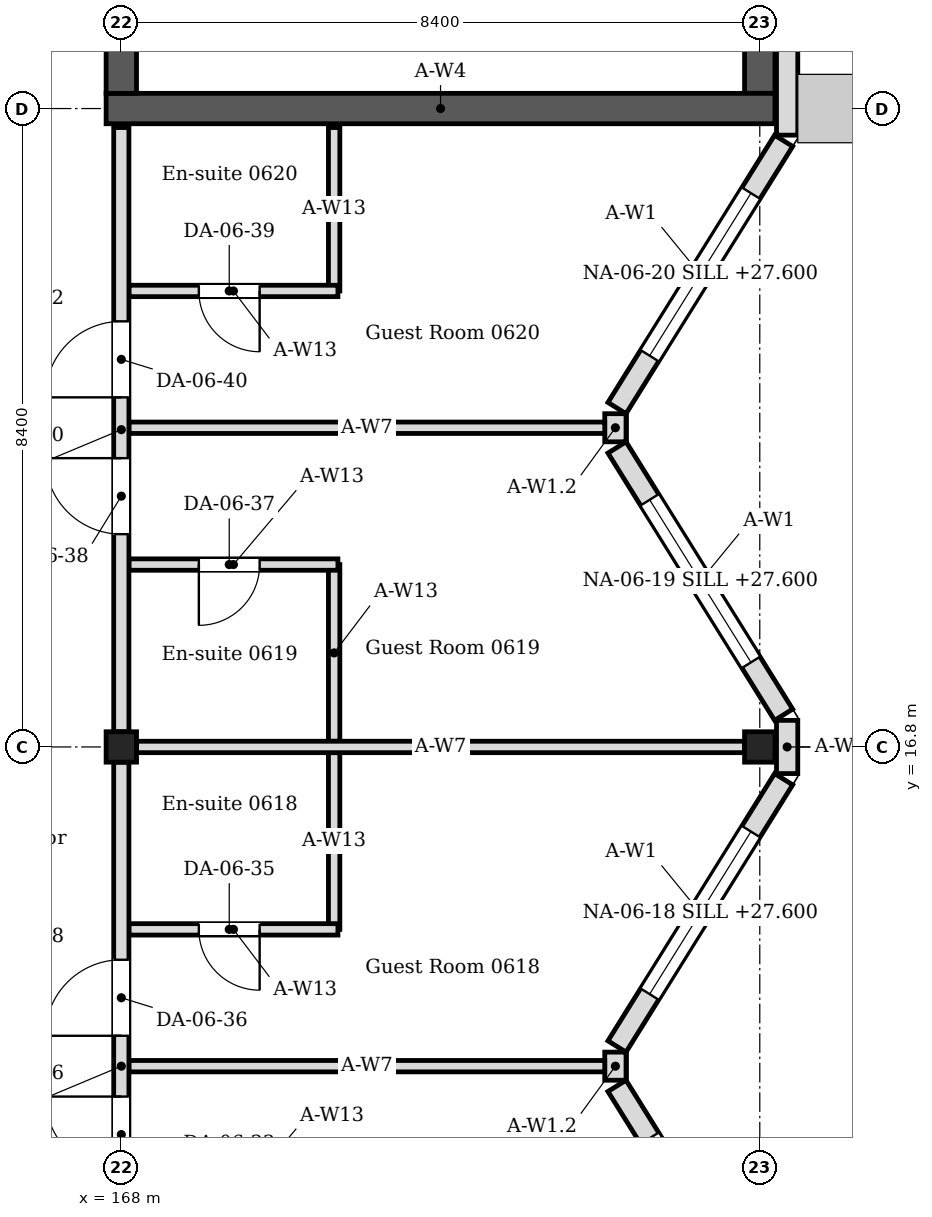
"""IFC4 building model, lengths in metres.
Left out: names, types, materials, properties, quantities, classifications, styles, units other than length and angle.
Written with IfcOpenShell. Run it as: python <this file> out.ifc"""

import sys

from ifc_helpers import new_model, si_unit, direction, frame, frame_2d, origin, origin_2d, place, context, subcontext, project, spatial, rectangle, i_section, extrude, element, fill, save


model = new_model("IFC4")
c1 = context("Model", 3, precision=1e-05, world=origin(), true_north=direction((0.0, 1.0)))
c2 = subcontext(c1, "Body", "Model", "MODEL_VIEW")
j1 = project(units=[si_unit("LENGTHUNIT", "METRE"), si_unit("PLANEANGLEUNIT", "RADIAN")], contexts=[c1])
p1 = place(None, origin())
s1 = spatial("IfcSite", under=j1, at=p1, CompositionType="ELEMENT")
p2 = place(p1, origin())
s2 = spatial("IfcBuilding", under=s1, at=p2, CompositionType="ELEMENT")
p3 = place(p2, frame((0.0, 0.0, 27.0)))
s3 = spatial("IfcBuildingStorey", under=s2, at=p3, CompositionType="ELEMENT", Elevation=27.0)
for number, where, z_axis, x_axis in (
    (1, (168.0, 16.8, 0.0), (0.0, 0.0, 1.0), (1.0, 0.0, 0.0)),
    (2, (176.4, 16.8, 0.0), (0.0, 0.0, 1.0), (1.0, 0.0, 0.0)),
):
    element("IfcColumn", number, at=place(p3, frame(where, z_axis=z_axis, x_axis=x_axis)), inside=s3, PredefinedType="COLUMN", context=c2, shape_type="SweptSolid", body=[
        extrude(i_section(OverallWidth=0.4, OverallDepth=0.4, WebThickness=0.013, FlangeThickness=0.021, FilletRadius=0.022, at=origin_2d()), origin(), (0.0, 0.0, 1.0), 4.2),
    ])
p4 = place(p3, frame((167.8, 25.2, 0.0), z_axis=(0.0, 0.0, 1.0), x_axis=(1.0, 0.0, 0.0)))
e3 = element("IfcWall", 3, at=p4, inside=s3, PredefinedType="SOLIDWALL", context=c2, shape_type="SweptSolid", body=[
    extrude(rectangle(XDim=8.8, YDim=0.4, at=frame_2d((4.4, 0.0))), origin(), (0.0, 0.0, 1.0), 4.05),
])
p5 = place(p3, frame((168.0, 25.4, 0.0), z_axis=(0.0, 0.0, 1.0), x_axis=(0.0, 1.0, 0.0)))
e4 = element("IfcWall", 4, at=p5, inside=s3, PredefinedType="SOLIDWALL", context=c2, shape_type="SweptSolid", body=[
    extrude(rectangle(XDim=16.4, YDim=0.4, at=frame_2d((8.2, 0.0))), origin(), (0.0, 0.0, 1.0), 4.05),
])
p6 = place(p5, frame((1.0, 0.0, 0.0)))
e5 = element("IfcOpeningElement", 5, at=p6, cuts=e4, PredefinedType="OPENING", context=c2, shape_type="SweptSolid", body=[
    extrude(rectangle(XDim=1.0, YDim=2.1, at=frame_2d((0.5, 1.05))), frame((0.0, 0.21, 0.0), z_axis=(0.0, -1.0, 0.0), x_axis=(1.0, 0.0, 0.0)), (0.0, 0.0, 1.0), 0.42),
])
p7 = place(p5, frame((14.4, 0.0, 0.0)))
e6 = element("IfcOpeningElement", 6, at=p7, cuts=e4, PredefinedType="OPENING", context=c2, shape_type="SweptSolid", body=[
    extrude(rectangle(XDim=1.4, YDim=2.1, at=frame_2d((0.7, 1.05))), frame((0.0, 0.21, 0.0), z_axis=(0.0, -1.0, 0.0), x_axis=(1.0, 0.0, 0.0)), (0.0, 0.0, 1.0), 0.42),
])
p8 = place(p3, frame((176.4, 25.4, 0.0), z_axis=(0.0, 0.0, 1.0), x_axis=(0.0, 1.0, 0.0)))
e7 = element("IfcWall", 7, at=p8, inside=s3, PredefinedType="SOLIDWALL", context=c2, shape_type="SweptSolid", body=[
    extrude(rectangle(XDim=16.4, YDim=0.4, at=frame_2d((8.2, 0.0))), origin(), (0.0, 0.0, 1.0), 4.05),
])
p9 = place(p3, frame((176.714, 8.824, 0.0), z_axis=(0.0, 0.0, 1.0), x_axis=(-0.529018946142, 0.848610013271, 0.0)))
e8 = element("IfcWall", 8, at=p9, inside=s3, PredefinedType="SOLIDWALL", context=c2, shape_type="SweptSolid", body=[
    extrude(rectangle(XDim=4.144, YDim=0.28, at=frame_2d((2.072, 0.0))), origin(), (0.0, 0.0, 1.0), 4.05),
])
p10 = place(p9, frame((0.812, 0.0, 0.6)))
e9 = element("IfcOpeningElement", 9, at=p10, cuts=e8, PredefinedType="OPENING", context=c2, shape_type="SweptSolid", body=[
    extrude(rectangle(XDim=2.52, YDim=2.4, at=frame_2d((1.26, 1.2))), frame((0.0, 0.15, 0.0), z_axis=(0.0, -1.0, 0.0), x_axis=(1.0, 0.0, 0.0)), (0.0, 0.0, 1.0), 0.3),
])
p11 = place(p3, frame((174.521, 12.859, 0.0), z_axis=(0.0, 0.0, 1.0), x_axis=(0.528992500338, 0.848626498871, 0.0)))
e10 = element("IfcWall", 10, at=p11, inside=s3, PredefinedType="SOLIDWALL", context=c2, shape_type="SweptSolid", body=[
    extrude(rectangle(XDim=4.145, YDim=0.28, at=frame_2d((2.072, 0.0))), origin(), (0.0, 0.0, 1.0), 4.05),
])
p12 = place(p11, frame((0.812, 0.0, 0.6)))
e11 = element("IfcOpeningElement", 11, at=p12, cuts=e10, PredefinedType="OPENING", context=c2, shape_type="SweptSolid", body=[
    extrude(rectangle(XDim=2.52, YDim=2.4, at=frame_2d((1.26, 1.2))), frame((0.0, 0.15, 0.0), z_axis=(0.0, -1.0, 0.0), x_axis=(1.0, 0.0, 0.0)), (0.0, 0.0, 1.0), 0.3),
])
p13 = place(p3, frame((174.5, 12.415, 0.0), z_axis=(0.0, 0.0, 1.0), x_axis=(0.0, 1.0, 0.0)))
e12 = element("IfcWall", 12, at=p13, inside=s3, PredefinedType="SOLIDWALL", context=c2, shape_type="SweptSolid", body=[
    extrude(rectangle(XDim=0.37, YDim=0.28, at=frame_2d((0.185, 0.0))), origin(), (0.0, 0.0, 1.0), 3.604),
])
p14 = place(p3, frame((176.76, 16.45, 0.0), z_axis=(0.0, 0.0, 1.0), x_axis=(0.0, 1.0, 0.0)))
e13 = element("IfcWall", 13, at=p14, inside=s3, PredefinedType="SOLIDWALL", context=c2, shape_type="SweptSolid", body=[
    extrude(rectangle(XDim=0.7, YDim=0.28, at=frame_2d((0.35, 0.0))), origin(), (0.0, 0.0, 1.0), 4.05),
])
p15 = place(p3, frame((176.714, 17.224, 0.0), z_axis=(0.0, 0.0, 1.0), x_axis=(-0.529018946142, 0.848610013271, 0.0)))
e14 = element("IfcWall", 14, at=p15, inside=s3, PredefinedType="SOLIDWALL", context=c2, shape_type="SweptSolid", body=[
    extrude(rectangle(XDim=4.144, YDim=0.28, at=frame_2d((2.072, 0.0))), origin(), (0.0, 0.0, 1.0), 4.05),
])
p16 = place(p15, frame((0.812, 0.0, 0.6)))
e15 = element("IfcOpeningElement", 15, at=p16, cuts=e14, PredefinedType="OPENING", context=c2, shape_type="SweptSolid", body=[
    extrude(rectangle(XDim=2.52, YDim=2.4, at=frame_2d((1.26, 1.2))), frame((0.0, 0.15, 0.0), z_axis=(0.0, -1.0, 0.0), x_axis=(1.0, 0.0, 0.0)), (0.0, 0.0, 1.0), 0.3),
])
p17 = place(p3, frame((174.521, 21.259, 0.0), z_axis=(0.0, 0.0, 1.0), x_axis=(0.529018946142, 0.848610013271, 0.0)))
e16 = element("IfcWall", 16, at=p17, inside=s3, PredefinedType="SOLIDWALL", context=c2, shape_type="SweptSolid", body=[
    extrude(rectangle(XDim=4.144, YDim=0.28, at=frame_2d((2.072, 0.0))), origin(), (0.0, 0.0, 1.0), 4.05),
])
p18 = place(p17, frame((0.812, 0.0, 0.6)))
e17 = element("IfcOpeningElement", 17, at=p18, cuts=e16, PredefinedType="OPENING", context=c2, shape_type="SweptSolid", body=[
    extrude(rectangle(XDim=2.52, YDim=2.4, at=frame_2d((1.26, 1.2))), frame((0.0, 0.15, 0.0), z_axis=(0.0, -1.0, 0.0), x_axis=(1.0, 0.0, 0.0)), (0.0, 0.0, 1.0), 0.3),
])
p19 = place(p3, frame((174.5, 20.815, 0.0), z_axis=(0.0, 0.0, 1.0), x_axis=(0.0, 1.0, 0.0)))
e18 = element("IfcWall", 18, at=p19, inside=s3, PredefinedType="SOLIDWALL", context=c2, shape_type="SweptSolid", body=[
    extrude(rectangle(XDim=0.37, YDim=0.28, at=frame_2d((0.185, 0.0))), origin(), (0.0, 0.0, 1.0), 3.604),
])
p20 = place(p3, frame((176.76, 24.85, 0.0), z_axis=(0.0, 0.0, 1.0), x_axis=(0.0, 1.0, 0.0)))
e19 = element("IfcWall", 19, at=p20, inside=s3, PredefinedType="SOLIDWALL", context=c2, shape_type="SweptSolid", body=[
    extrude(rectangle(XDim=42.57, YDim=0.28, at=frame_2d((21.285, 0.0))), origin(), (0.0, 0.0, 1.0), 4.05),
])
p21 = place(p20, frame((17.57, 0.0, 0.6)))
e20 = element("IfcOpeningElement", 20, at=p21, cuts=e19, PredefinedType="OPENING", context=c2, shape_type="SweptSolid", body=[
    extrude(rectangle(XDim=2.52, YDim=2.4, at=frame_2d((1.26, 1.2))), frame((0.0, 0.15, 0.0), z_axis=(0.0, -1.0, 0.0), x_axis=(1.0, 0.0, 0.0)), (0.0, 0.0, 1.0), 0.3),
])
p22 = place(p20, frame((21.77, 0.0, 0.6)))
e21 = element("IfcOpeningElement", 21, at=p22, cuts=e19, PredefinedType="OPENING", context=c2, shape_type="SweptSolid", body=[
    extrude(rectangle(XDim=2.52, YDim=2.4, at=frame_2d((1.26, 1.2))), frame((0.0, 0.15, 0.0), z_axis=(0.0, -1.0, 0.0), x_axis=(1.0, 0.0, 0.0)), (0.0, 0.0, 1.0), 0.3),
])
p23 = place(p20, frame((26.81, 0.0, 0.45)))
e22 = element("IfcOpeningElement", 22, at=p23, cuts=e19, PredefinedType="OPENING", context=c2, shape_type="SweptSolid", body=[
    extrude(rectangle(XDim=2.52, YDim=2.1, at=frame_2d((1.26, 1.05))), frame((0.0, 0.15, 0.0), z_axis=(0.0, -1.0, 0.0), x_axis=(1.0, 0.0, 0.0)), (0.0, 0.0, 1.0), 0.3),
])
p24 = place(p20, frame((31.01, 0.0, 0.6)))
e23 = element("IfcOpeningElement", 23, at=p24, cuts=e19, PredefinedType="OPENING", context=c2, shape_type="SweptSolid", body=[
    extrude(rectangle(XDim=2.52, YDim=2.4, at=frame_2d((1.26, 1.2))), frame((0.0, 0.15, 0.0), z_axis=(0.0, -1.0, 0.0), x_axis=(1.0, 0.0, 0.0)), (0.0, 0.0, 1.0), 0.3),
])
p25 = place(p3, frame((170.8, 14.4, 0.0), z_axis=(0.0, 0.0, 1.0), x_axis=(0.0, 1.0, 0.0)))
e24 = element("IfcWall", 24, at=p25, inside=s3, PredefinedType="PARTITIONING", context=c2, shape_type="SweptSolid", body=[
    extrude(rectangle(XDim=2.325, YDim=0.15, at=frame_2d((1.163, 0.0))), origin(), (0.0, 0.0, 1.0), 4.05),
])
p26 = place(p3, frame((170.85, 14.4, 0.0), z_axis=(0.0, 0.0, 1.0), x_axis=(-1.0, 0.0, 0.0)))
e25 = element("IfcWall", 25, at=p26, inside=s3, PredefinedType="PARTITIONING", context=c2, shape_type="SweptSolid", body=[
    extrude(rectangle(XDim=2.75, YDim=0.15, at=frame_2d((1.375, 0.0))), origin(), (0.0, 0.0, 1.0), 4.05),
])
p27 = place(p26, frame((1.03, 0.0, 0.0)))
e26 = element("IfcOpeningElement", 26, at=p27, cuts=e25, PredefinedType="OPENING", context=c2, shape_type="SweptSolid", body=[
    extrude(rectangle(XDim=0.8, YDim=2.1, at=frame_2d((0.4, 1.05))), frame((0.0, 0.085, 0.0), z_axis=(0.0, -1.0, 0.0), x_axis=(1.0, 0.0, 0.0)), (0.0, 0.0, 1.0), 0.17),
])
p28 = place(p3, frame((170.8, 16.875, 0.0), z_axis=(0.0, 0.0, 1.0), x_axis=(0.0, 1.0, 0.0)))
e27 = element("IfcWall", 27, at=p28, inside=s3, PredefinedType="PARTITIONING", context=c2, shape_type="SweptSolid", body=[
    extrude(rectangle(XDim=2.325, YDim=0.15, at=frame_2d((1.163, 0.0))), origin(), (0.0, 0.0, 1.0), 4.05),
])
p29 = place(p3, frame((170.85, 19.2, 0.0), z_axis=(0.0, 0.0, 1.0), x_axis=(-1.0, 0.0, 0.0)))
e28 = element("IfcWall", 28, at=p29, inside=s3, PredefinedType="PARTITIONING", context=c2, shape_type="SweptSolid", body=[
    extrude(rectangle(XDim=2.75, YDim=0.15, at=frame_2d((1.375, 0.0))), origin(), (0.0, 0.0, 1.0), 4.05),
])
p30 = place(p29, frame((1.03, 0.0, 0.0)))
e29 = element("IfcOpeningElement", 29, at=p30, cuts=e28, PredefinedType="OPENING", context=c2, shape_type="SweptSolid", body=[
    extrude(rectangle(XDim=0.8, YDim=2.1, at=frame_2d((0.4, 1.05))), frame((0.0, 0.085, 0.0), z_axis=(0.0, -1.0, 0.0), x_axis=(1.0, 0.0, 0.0)), (0.0, 0.0, 1.0), 0.17),
])
p31 = place(p3, frame((170.8, 22.8, 0.0), z_axis=(0.0, 0.0, 1.0), x_axis=(0.0, 1.0, 0.0)))
e30 = element("IfcWall", 30, at=p31, inside=s3, PredefinedType="PARTITIONING", context=c2, shape_type="SweptSolid", body=[
    extrude(rectangle(XDim=2.15, YDim=0.15, at=frame_2d((1.075, 0.0))), origin(), (0.0, 0.0, 1.0), 4.05),
])
p32 = place(p3, frame((170.85, 22.8, 0.0), z_axis=(0.0, 0.0, 1.0), x_axis=(-1.0, 0.0, 0.0)))
e31 = element("IfcWall", 31, at=p32, inside=s3, PredefinedType="PARTITIONING", context=c2, shape_type="SweptSolid", body=[
    extrude(rectangle(XDim=2.75, YDim=0.15, at=frame_2d((1.375, 0.0))), origin(), (0.0, 0.0, 1.0), 4.05),
])
p33 = place(p32, frame((1.03, 0.0, 0.0)))
e32 = element("IfcOpeningElement", 32, at=p33, cuts=e31, PredefinedType="OPENING", context=c2, shape_type="SweptSolid", body=[
    extrude(rectangle(XDim=0.8, YDim=2.1, at=frame_2d((0.4, 1.05))), frame((0.0, 0.085, 0.0), z_axis=(0.0, -1.0, 0.0), x_axis=(1.0, 0.0, 0.0)), (0.0, 0.0, 1.0), 0.17),
])
p34 = place(p3, frame((168.2, 16.8, 0.0), z_axis=(0.0, 0.0, 1.0), x_axis=(1.0, 0.0, 0.0)))
e33 = element("IfcWall", 33, at=p34, inside=s3, PredefinedType="PARTITIONING", context=c2, shape_type="SweptSolid", body=[
    extrude(rectangle(XDim=8.0, YDim=0.15, at=frame_2d((4.0, 0.0))), origin(), (0.0, 0.0, 1.0), 3.604),
])
for number, where, z_axis, x_axis in (
    (34, (168.1, 12.6, 0.0), (0.0, 0.0, 1.0), (1.0, 0.0, 0.0)),
    (35, (168.1, 21.0, 0.0), (0.0, 0.0, 1.0), (1.0, 0.0, 0.0)),
):
    element("IfcWall", number, at=place(p3, frame(where, z_axis=z_axis, x_axis=x_axis)), inside=s3, PredefinedType="PARTITIONING", context=c2, shape_type="SweptSolid", body=[
        extrude(rectangle(XDim=6.26, YDim=0.15, at=frame_2d((3.13, 0.0))), origin(), (0.0, 0.0, 1.0), 3.604),
    ])
p35 = place(p3, frame((168.0, 8.6, 0.0), z_axis=(0.0, 0.0, 1.0), x_axis=(0.0, 1.0, 0.0)))
e36 = element("IfcWall", 36, at=p35, inside=s3, PredefinedType="PARTITIONING", context=c2, shape_type="SweptSolid", body=[
    extrude(rectangle(XDim=8.0, YDim=0.2, at=frame_2d((4.0, 0.0))), origin(), (0.0, 0.0, 1.0), 3.45),
])
p36 = place(p35, frame((2.6, 0.0, 0.0)))
e37 = element("IfcOpeningElement", 37, at=p36, cuts=e36, PredefinedType="OPENING", context=c2, shape_type="SweptSolid", body=[
    extrude(rectangle(XDim=1.0, YDim=2.4, at=frame_2d((0.5, 1.2))), frame((0.0, 0.11, 0.0), z_axis=(0.0, -1.0, 0.0), x_axis=(1.0, 0.0, 0.0)), (0.0, 0.0, 1.0), 0.22),
])
p37 = place(p35, frame((4.4, 0.0, 0.0)))
e38 = element("IfcOpeningElement", 38, at=p37, cuts=e36, PredefinedType="OPENING", context=c2, shape_type="SweptSolid", body=[
    extrude(rectangle(XDim=1.0, YDim=2.4, at=frame_2d((0.5, 1.2))), frame((0.0, 0.11, 0.0), z_axis=(0.0, -1.0, 0.0), x_axis=(1.0, 0.0, 0.0)), (0.0, 0.0, 1.0), 0.22),
])
p38 = place(p3, frame((168.0, 17.0, 0.0), z_axis=(0.0, 0.0, 1.0), x_axis=(0.0, 1.0, 0.0)))
e39 = element("IfcWall", 39, at=p38, inside=s3, PredefinedType="PARTITIONING", context=c2, shape_type="SweptSolid", body=[
    extrude(rectangle(XDim=7.95, YDim=0.2, at=frame_2d((3.975, 0.0))), origin(), (0.0, 0.0, 1.0), 3.45),
])
p39 = place(p38, frame((2.6, 0.0, 0.0)))
e40 = element("IfcOpeningElement", 40, at=p39, cuts=e39, PredefinedType="OPENING", context=c2, shape_type="SweptSolid", body=[
    extrude(rectangle(XDim=1.0, YDim=2.4, at=frame_2d((0.5, 1.2))), frame((0.0, 0.11, 0.0), z_axis=(0.0, -1.0, 0.0), x_axis=(1.0, 0.0, 0.0)), (0.0, 0.0, 1.0), 0.22),
])
p40 = place(p38, frame((4.4, 0.0, 0.0)))
e41 = element("IfcOpeningElement", 41, at=p40, cuts=e39, PredefinedType="OPENING", context=c2, shape_type="SweptSolid", body=[
    extrude(rectangle(XDim=1.0, YDim=2.4, at=frame_2d((0.5, 1.2))), frame((0.0, 0.11, 0.0), z_axis=(0.0, -1.0, 0.0), x_axis=(1.0, 0.0, 0.0)), (0.0, 0.0, 1.0), 0.22),
])
p41 = place(p12, origin())
e42 = element("IfcWindow", 42, at=p41, inside=s3, PartitioningType="SINGLE_PANEL", PredefinedType="WINDOW", context=c2, shape_type="SweptSolid", body=[
    extrude(rectangle(XDim=2.52, YDim=2.4, at=frame_2d((1.26, 1.2))), frame((0.0, 0.03, 0.0), z_axis=(0.0, -1.0, 0.0), x_axis=(1.0, 0.0, 0.0)), (0.0, 0.0, 1.0), 0.06),
])
fill(e11, e42)
p42 = place(p16, origin())
e43 = element("IfcWindow", 43, at=p42, inside=s3, PartitioningType="SINGLE_PANEL", PredefinedType="WINDOW", context=c2, shape_type="SweptSolid", body=[
    extrude(rectangle(XDim=2.52, YDim=2.4, at=frame_2d((1.26, 1.2))), frame((0.0, 0.03, 0.0), z_axis=(0.0, -1.0, 0.0), x_axis=(1.0, 0.0, 0.0)), (0.0, 0.0, 1.0), 0.06),
])
fill(e15, e43)
p43 = place(p18, origin())
e44 = element("IfcWindow", 44, at=p43, inside=s3, PartitioningType="SINGLE_PANEL", PredefinedType="WINDOW", context=c2, shape_type="SweptSolid", body=[
    extrude(rectangle(XDim=2.52, YDim=2.4, at=frame_2d((1.26, 1.2))), frame((0.0, 0.03, 0.0), z_axis=(0.0, -1.0, 0.0), x_axis=(1.0, 0.0, 0.0)), (0.0, 0.0, 1.0), 0.06),
])
fill(e17, e44)
p44 = place(p36, origin())
e45 = element("IfcDoor", 45, at=p44, inside=s3, OperationType="SINGLE_SWING_RIGHT", PredefinedType="DOOR", context=c2, shape_type="SweptSolid", body=[
    extrude(rectangle(XDim=1.0, YDim=2.4, at=frame_2d((0.5, 1.2))), frame((0.0, 0.025, 0.0), z_axis=(0.0, -1.0, 0.0), x_axis=(1.0, 0.0, 0.0)), (0.0, 0.0, 1.0), 0.05),
])
fill(e37, e45)
p45 = place(p27, origin())
e46 = element("IfcDoor", 46, at=p45, inside=s3, OperationType="SINGLE_SWING_LEFT", PredefinedType="DOOR", context=c2, shape_type="SweptSolid", body=[
    extrude(rectangle(XDim=0.8, YDim=2.1, at=frame_2d((0.4, 1.05))), frame((0.0, 0.025, 0.0), z_axis=(0.0, -1.0, 0.0), x_axis=(1.0, 0.0, 0.0)), (0.0, 0.0, 1.0), 0.05),
])
fill(e26, e46)
p46 = place(p37, origin())
e47 = element("IfcDoor", 47, at=p46, inside=s3, OperationType="SINGLE_SWING_LEFT", PredefinedType="DOOR", context=c2, shape_type="SweptSolid", body=[
    extrude(rectangle(XDim=1.0, YDim=2.4, at=frame_2d((0.5, 1.2))), frame((0.0, 0.025, 0.0), z_axis=(0.0, -1.0, 0.0), x_axis=(1.0, 0.0, 0.0)), (0.0, 0.0, 1.0), 0.05),
])
fill(e38, e47)
p47 = place(p30, origin())
e48 = element("IfcDoor", 48, at=p47, inside=s3, OperationType="SINGLE_SWING_RIGHT", PredefinedType="DOOR", context=c2, shape_type="SweptSolid", body=[
    extrude(rectangle(XDim=0.8, YDim=2.1, at=frame_2d((0.4, 1.05))), frame((0.0, 0.025, 0.0), z_axis=(0.0, -1.0, 0.0), x_axis=(1.0, 0.0, 0.0)), (0.0, 0.0, 1.0), 0.05),
])
fill(e29, e48)
p48 = place(p39, origin())
e49 = element("IfcDoor", 49, at=p48, inside=s3, OperationType="SINGLE_SWING_RIGHT", PredefinedType="DOOR", context=c2, shape_type="SweptSolid", body=[
    extrude(rectangle(XDim=1.0, YDim=2.4, at=frame_2d((0.5, 1.2))), frame((0.0, 0.025, 0.0), z_axis=(0.0, -1.0, 0.0), x_axis=(1.0, 0.0, 0.0)), (0.0, 0.0, 1.0), 0.05),
])
fill(e40, e49)
p49 = place(p33, origin())
e50 = element("IfcDoor", 50, at=p49, inside=s3, OperationType="SINGLE_SWING_LEFT", PredefinedType="DOOR", context=c2, shape_type="SweptSolid", body=[
    extrude(rectangle(XDim=0.8, YDim=2.1, at=frame_2d((0.4, 1.05))), frame((0.0, 0.025, 0.0), z_axis=(0.0, -1.0, 0.0), x_axis=(1.0, 0.0, 0.0)), (0.0, 0.0, 1.0), 0.05),
])
fill(e32, e50)
p50 = place(p40, origin())
e51 = element("IfcDoor", 51, at=p50, inside=s3, OperationType="SINGLE_SWING_LEFT", PredefinedType="DOOR", context=c2, shape_type="SweptSolid", body=[
    extrude(rectangle(XDim=1.0, YDim=2.4, at=frame_2d((0.5, 1.2))), frame((0.0, 0.025, 0.0), z_axis=(0.0, -1.0, 0.0), x_axis=(1.0, 0.0, 0.0)), (0.0, 0.0, 1.0), 0.05),
])
fill(e41, e51)
save(model, sys.argv[1])
